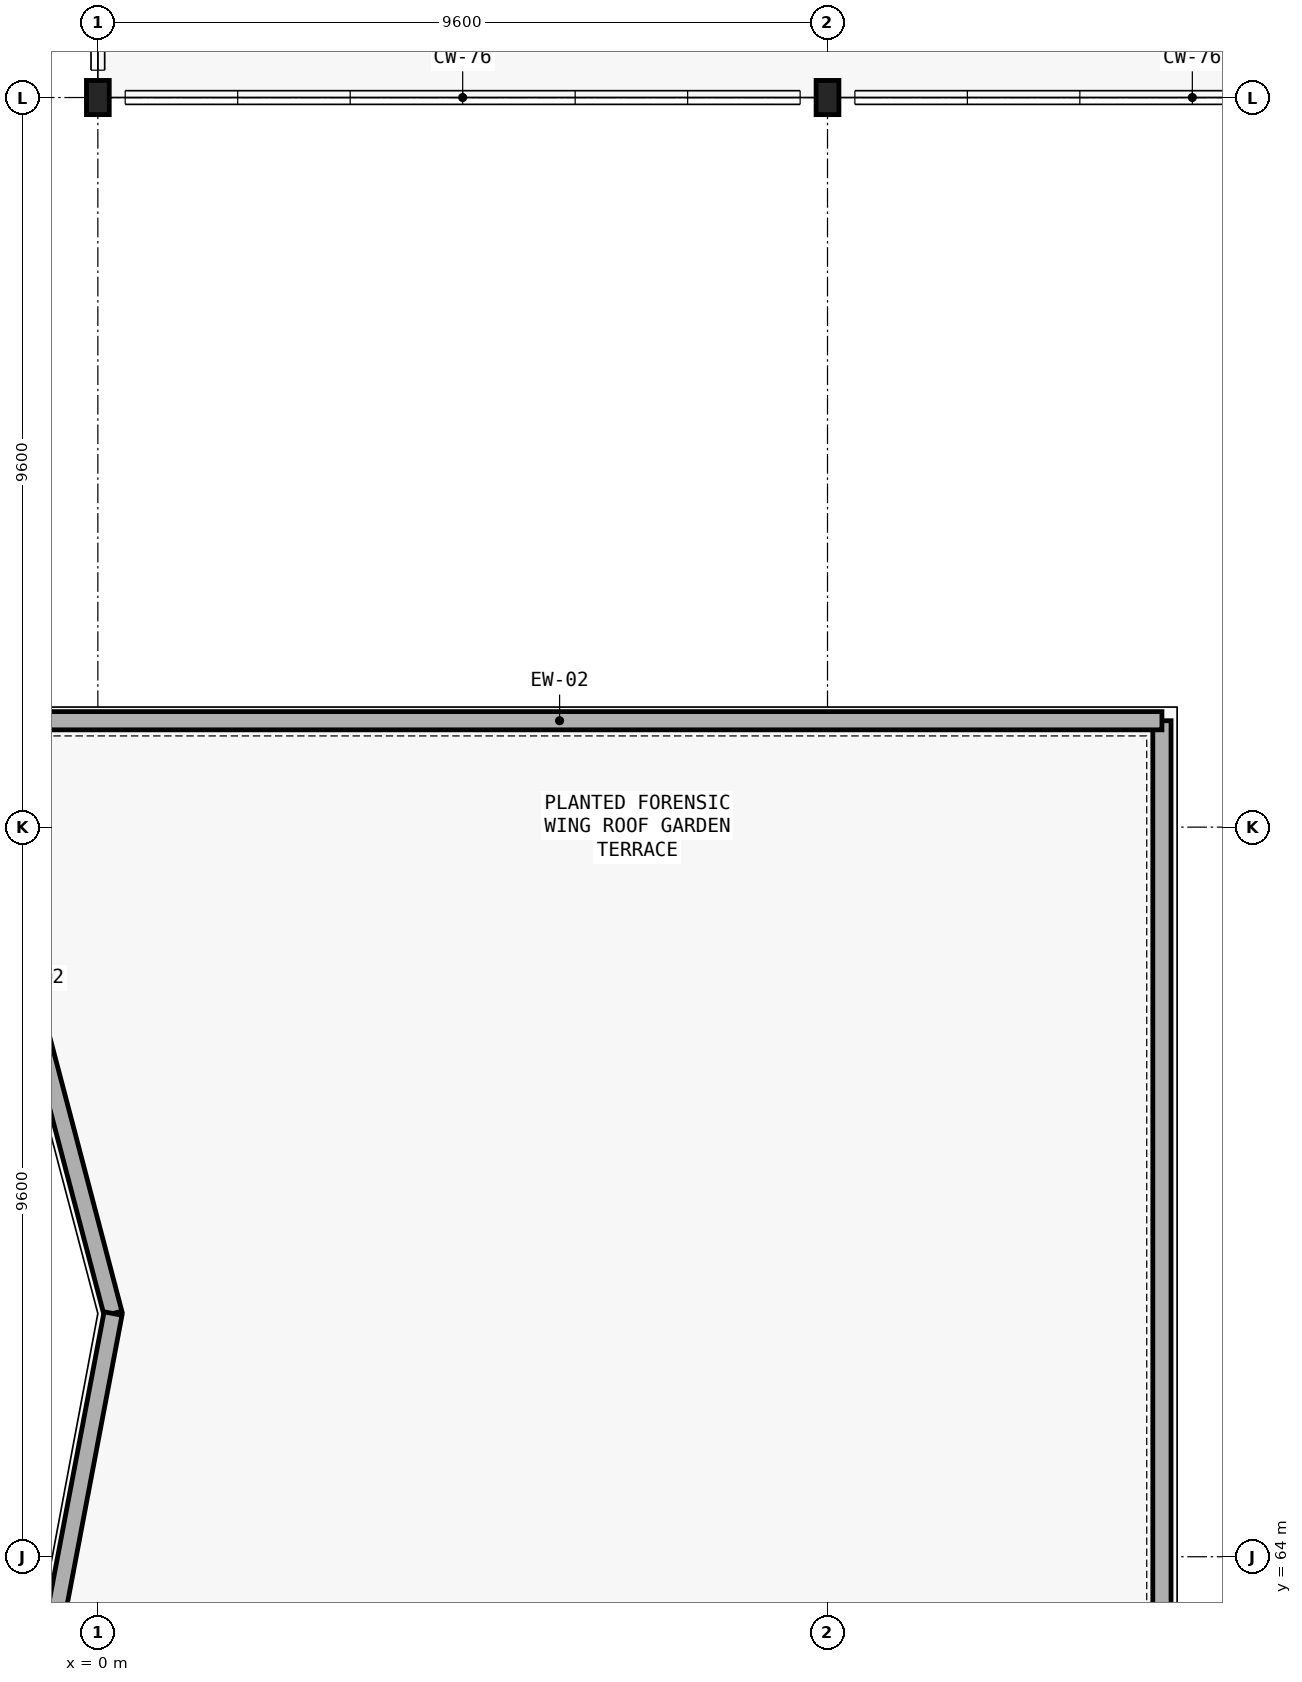
"""IFC4 building model, lengths in metres.
Left out: names, types, materials, properties, quantities, classifications, styles, units other than length and angle.
Written with IfcOpenShell. Run it as: python <this file> out.ifc"""

import sys

from ifc_helpers import new_model, si_unit, direction, frame, frame_2d, origin, origin_2d, place, context, subcontext, project, spatial, rectangle, i_section, extrude, element, save


model = new_model("IFC4")
c1 = context("Model", 3, precision=1e-05, world=origin(), true_north=direction((0.0, 1.0)))
c2 = subcontext(c1, "Body", "Model", "MODEL_VIEW")
j1 = project(units=[si_unit("LENGTHUNIT", "METRE"), si_unit("PLANEANGLEUNIT", "RADIAN")], contexts=[c1])
p1 = place(None, origin())
s1 = spatial("IfcSite", under=j1, at=p1, CompositionType="ELEMENT")
p2 = place(p1, origin())
s2 = spatial("IfcBuilding", under=s1, at=p2, CompositionType="ELEMENT")
p3 = place(p2, frame((0.0, 0.0, 26.25)))
s3 = spatial("IfcBuildingStorey", under=s2, at=p3, CompositionType="ELEMENT", Elevation=26.25)
for number, where, z_axis, x_axis in (
    (1, (0.0, 83.2, 0.0), (0.0, 0.0, 1.0), (1.0, 0.0, 0.0)),
    (2, (9.6, 83.2, 0.0), (0.0, 0.0, 1.0), (1.0, 0.0, 0.0)),
):
    element("IfcColumn", number, at=place(p3, frame(where, z_axis=z_axis, x_axis=x_axis)), inside=s3, PredefinedType="COLUMN", context=c2, shape_type="SweptSolid", body=[
        extrude(i_section(OverallWidth=0.3, OverallDepth=0.45, WebThickness=0.014, FlangeThickness=0.026, FilletRadius=0.027, at=origin_2d()), origin(), (0.0, 0.0, 1.0), 4.9),
    ])
p4 = place(p3, frame((14.0, 29.0, 0.0), z_axis=(0.0, 0.0, 1.0), x_axis=(0.0, 1.0, 0.0)))
e3 = element("IfcWall", 3, at=p4, inside=s3, PredefinedType="PARAPET", context=c2, shape_type="SweptSolid", body=[
    extrude(rectangle(XDim=46.0, YDim=0.24, at=frame_2d((23.0, 0.0))), origin(), (0.0, 0.0, 1.0), 1.1),
])
p5 = place(p3, frame((14.0, 75.0, 0.0), z_axis=(0.0, 0.0, 1.0), x_axis=(-1.0, 0.0, 0.0)))
e4 = element("IfcWall", 4, at=p5, inside=s3, PredefinedType="PARAPET", context=c2, shape_type="SweptSolid", body=[
    extrude(rectangle(XDim=15.85, YDim=0.24, at=frame_2d((7.925, 0.0))), origin(), (0.0, 0.0, 1.0), 1.1),
])
p6 = place(p3, frame((-1.85, 75.0, 0.0), z_axis=(0.0, 0.0, 1.0), x_axis=(0.254192294301, -0.967153699015, 0.0)))
e5 = element("IfcWall", 5, at=p6, inside=s3, PredefinedType="PARAPET", context=c2, shape_type="SweptSolid", body=[
    extrude(rectangle(XDim=8.065, YDim=0.24, at=frame_2d((4.032, 0.0))), origin(), (0.0, 0.0, 1.0), 1.1),
])
p7 = place(p3, frame((0.2, 67.2, 0.0), z_axis=(0.0, 0.0, 1.0), x_axis=(-0.186275016592, -0.982497642844, 0.0)))
e6 = element("IfcWall", 6, at=p7, inside=s3, PredefinedType="PARAPET", context=c2, shape_type="SweptSolid", body=[
    extrude(rectangle(XDim=9.771, YDim=0.24, at=frame_2d((4.885, 0.0))), origin(), (0.0, 0.0, 1.0), 1.1),
])
save(model, sys.argv[1])
